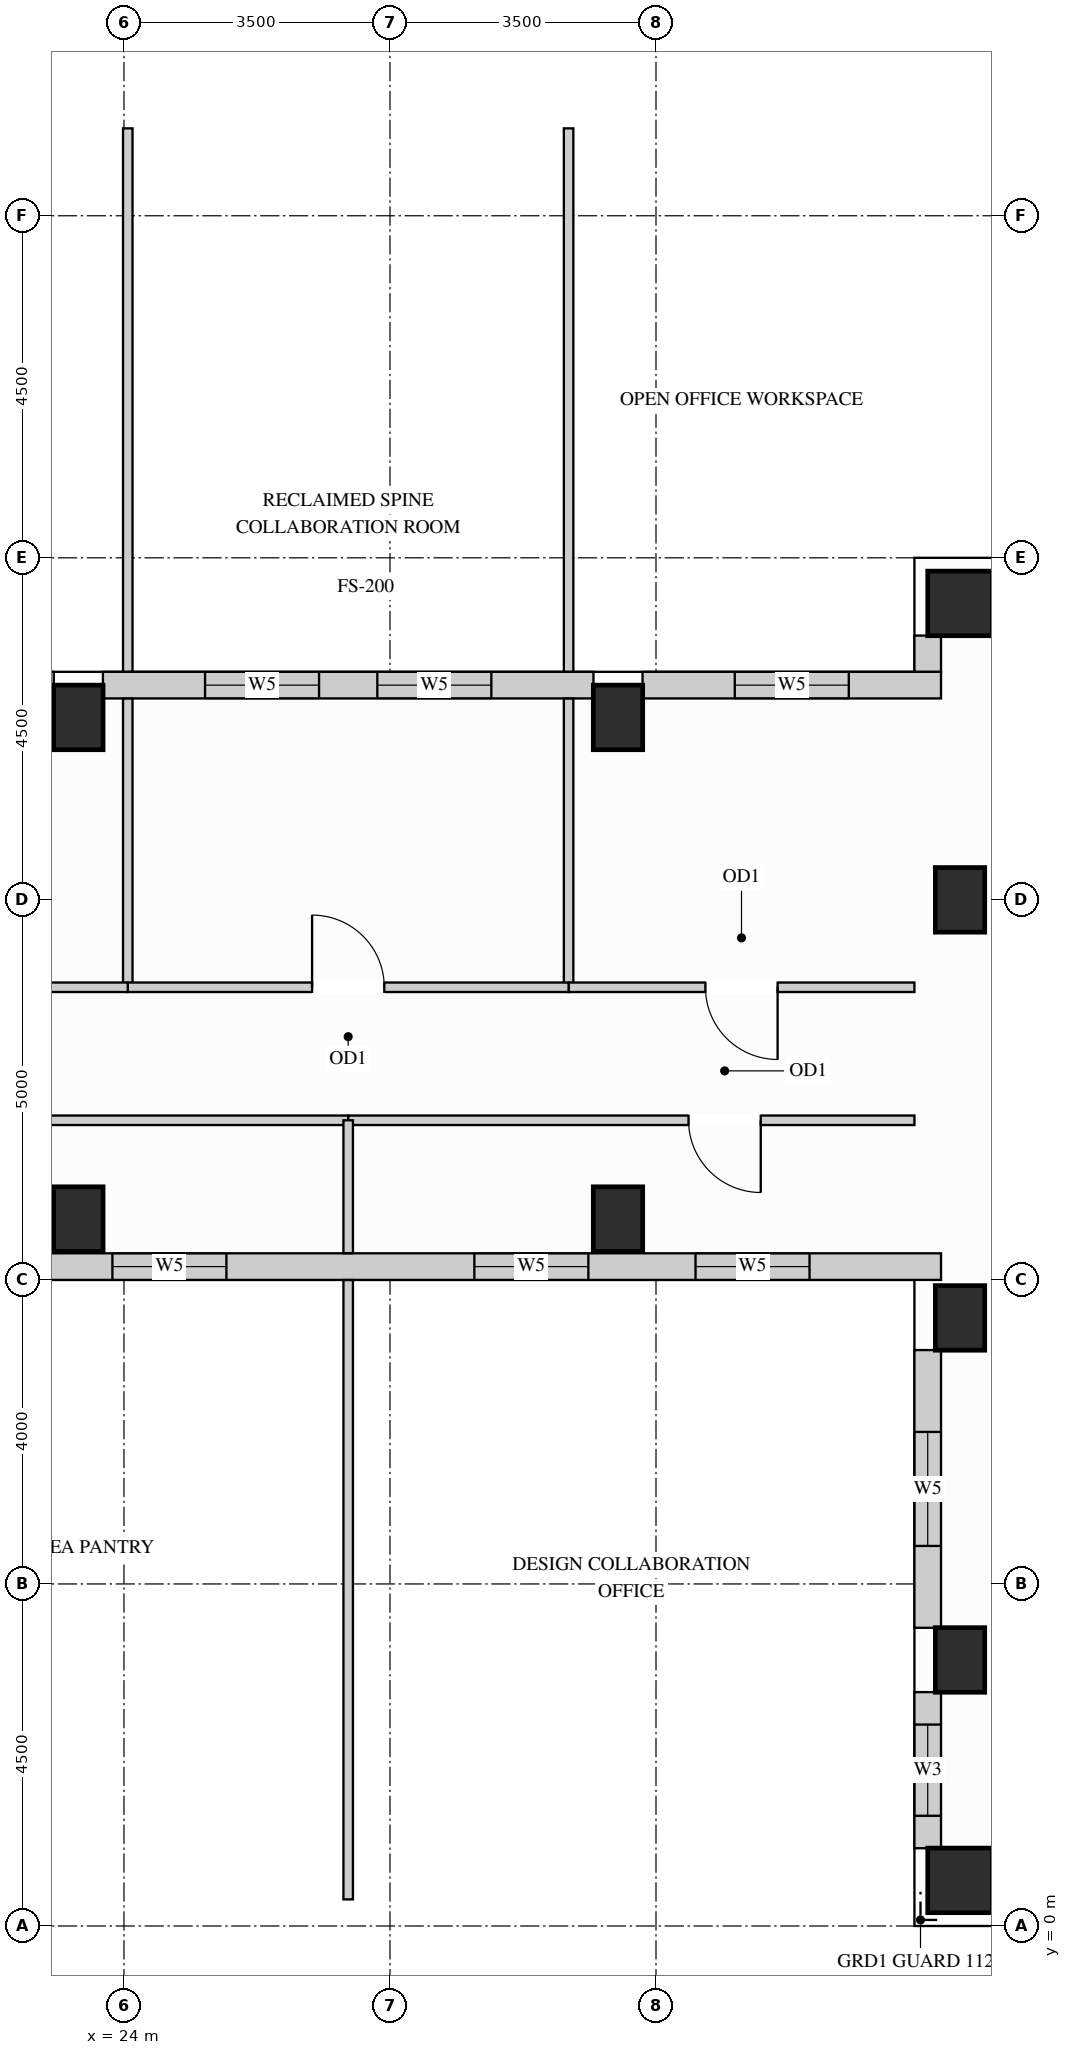
"""IFC4 building model, lengths in metres.
Left out: names, types, materials, properties, quantities, classifications, styles, units other than length and angle.
Written with IfcOpenShell. Run it as: python <this file> out.ifc"""

import sys

from ifc_helpers import new_model, si_unit, direction, frame, frame_2d, origin, origin_2d, place, context, subcontext, project, spatial, rectangle, extrude, source, transform, mapped, element, fill, save


model = new_model("IFC4")
c1 = context("Model", 3, precision=1e-05, world=origin(), true_north=direction((0.0, 1.0)))
c2 = subcontext(c1, "Body", "Model", "MODEL_VIEW")
j1 = project(units=[si_unit("LENGTHUNIT", "METRE"), si_unit("PLANEANGLEUNIT", "RADIAN")], contexts=[c1])
p1 = place(None, origin())
s1 = spatial("IfcSite", under=j1, at=p1, CompositionType="ELEMENT")
p2 = place(p1, origin())
s2 = spatial("IfcBuilding", under=s1, at=p2, CompositionType="ELEMENT")
p3 = place(p2, frame((0.0, 0.0, 237.6)))
s3 = spatial("IfcBuildingStorey", under=s2, at=p3, CompositionType="ELEMENT", Elevation=237.6)
m1 = source(origin(), c2, "Body", "SweptSolid", [
    extrude(rectangle(XDim=0.65, YDim=0.85, at=origin_2d()), origin(), (0.0, 0.0, 1.0), 3.4),
])
for number, where, z_axis, x_axis in (
    (1, (35.0, 13.5, 0.0), (0.0, 0.0, 1.0), (1.0, 0.0, 0.0)),
    (2, (35.0, 3.5, 0.0), (0.0, 0.0, 1.0), (1.0, 0.0, 0.0)),
    (3, (35.0, 8.0, 0.0), (0.0, 0.0, 1.0), (1.0, 0.0, 0.0)),
    (4, (23.4, 15.9, 0.0), (0.0, 0.0, 1.0), (1.0, 0.0, 0.0)),
    (5, (23.4, 9.3, 0.0), (0.0, 0.0, 1.0), (1.0, 0.0, 0.0)),
    (6, (30.5, 15.9, 0.0), (0.0, 0.0, 1.0), (1.0, 0.0, 0.0)),
    (7, (30.5, 9.3, 0.0), (0.0, 0.0, 1.0), (1.0, 0.0, 0.0)),
):
    element("IfcColumn", number, at=place(p3, frame(where, z_axis=z_axis, x_axis=x_axis)), inside=s3, PredefinedType="COLUMN", context=c2, shape_type="MappedRepresentation", body=[
        mapped(m1, transform((0.0, 0.0, 0.0), x_axis=(1.0, 0.0, 0.0), y_axis=(0.0, 1.0, 0.0), z_axis=(0.0, 0.0, 1.0))),
    ])
m2 = source(origin(), c2, "Body", "SweptSolid", [
    extrude(rectangle(XDim=0.85, YDim=0.85, at=origin_2d()), origin(), (0.0, 0.0, 1.0), 3.4),
])
for number, where, z_axis, x_axis in (
    (8, (35.0, 17.4, 0.0), (0.0, 0.0, 1.0), (1.0, 0.0, 0.0)),
    (9, (35.0, 0.6, 0.0), (0.0, 0.0, 1.0), (1.0, 0.0, 0.0)),
):
    element("IfcColumn", number, at=place(p3, frame(where, z_axis=z_axis, x_axis=x_axis)), inside=s3, PredefinedType="COLUMN", context=c2, shape_type="MappedRepresentation", body=[
        mapped(m2, transform((0.0, 0.0, 0.0), x_axis=(1.0, 0.0, 0.0), y_axis=(0.0, 1.0, 0.0), z_axis=(0.0, 0.0, 1.0))),
    ])
p4 = place(p3, frame((19.323, 8.675, 0.0), z_axis=(0.0, 0.0, 1.0), x_axis=(1.0, 0.0, 0.0)))
e10 = element("IfcWall", 10, at=p4, inside=s3, PredefinedType="SOLIDWALL", context=c2, shape_type="SweptSolid", body=[
    extrude(rectangle(XDim=15.427, YDim=0.35, at=frame_2d((7.713, 0.0))), origin(), (0.0, 0.0, 1.0), 3.385),
])
p5 = place(p4, frame((1.672, 0.0, 0.78)))
e11 = element("IfcOpeningElement", 11, at=p5, cuts=e10, PredefinedType="OPENING", context=c2, shape_type="SweptSolid", body=[
    extrude(rectangle(XDim=1.5, YDim=2.0, at=frame_2d((0.75, 1.0))), frame((0.0, 0.185, 0.0), z_axis=(0.0, -1.0, 0.0), x_axis=(1.0, 0.0, 0.0)), (0.0, 0.0, 1.0), 0.37),
])
p6 = place(p4, frame((4.525, 0.0, 0.78)))
e12 = element("IfcOpeningElement", 12, at=p6, cuts=e10, PredefinedType="OPENING", context=c2, shape_type="SweptSolid", body=[
    extrude(rectangle(XDim=1.5, YDim=2.0, at=frame_2d((0.75, 1.0))), frame((0.0, 0.185, 0.0), z_axis=(0.0, -1.0, 0.0), x_axis=(1.0, 0.0, 0.0)), (0.0, 0.0, 1.0), 0.37),
])
p7 = place(p4, frame((9.287, 0.0, 0.78)))
e13 = element("IfcOpeningElement", 13, at=p7, cuts=e10, PredefinedType="OPENING", context=c2, shape_type="SweptSolid", body=[
    extrude(rectangle(XDim=1.5, YDim=2.0, at=frame_2d((0.75, 1.0))), frame((0.0, 0.185, 0.0), z_axis=(0.0, -1.0, 0.0), x_axis=(1.0, 0.0, 0.0)), (0.0, 0.0, 1.0), 0.37),
])
p8 = place(p4, frame((12.197, 0.0, 0.78)))
e14 = element("IfcOpeningElement", 14, at=p8, cuts=e10, PredefinedType="OPENING", context=c2, shape_type="SweptSolid", body=[
    extrude(rectangle(XDim=1.5, YDim=2.0, at=frame_2d((0.75, 1.0))), frame((0.0, 0.185, 0.0), z_axis=(0.0, -1.0, 0.0), x_axis=(1.0, 0.0, 0.0)), (0.0, 0.0, 1.0), 0.37),
])
p9 = place(p3, frame((34.575, 7.577, 0.0), z_axis=(0.0, 0.0, 1.0), x_axis=(0.0, -1.0, 0.0)))
e15 = element("IfcWall", 15, at=p9, inside=s3, PredefinedType="SOLIDWALL", context=c2, shape_type="SweptSolid", body=[
    extrude(rectangle(XDim=3.654, YDim=0.35, at=frame_2d((1.827, 0.0))), origin(), (0.0, 0.0, 1.0), 3.385),
])
p10 = place(p9, frame((1.077, 0.0, 0.78)))
e16 = element("IfcOpeningElement", 16, at=p10, cuts=e15, PredefinedType="OPENING", context=c2, shape_type="SweptSolid", body=[
    extrude(rectangle(XDim=1.5, YDim=2.0, at=frame_2d((0.75, 1.0))), frame((0.0, 0.185, 0.0), z_axis=(0.0, -1.0, 0.0), x_axis=(1.0, 0.0, 0.0)), (0.0, 0.0, 1.0), 0.37),
])
p11 = place(p3, frame((34.575, 3.077, 0.0), z_axis=(0.0, 0.0, 1.0), x_axis=(0.0, -1.0, 0.0)))
e17 = element("IfcWall", 17, at=p11, inside=s3, PredefinedType="SOLIDWALL", context=c2, shape_type="SweptSolid", body=[
    extrude(rectangle(XDim=2.054, YDim=0.35, at=frame_2d((1.027, 0.0))), origin(), (0.0, 0.0, 1.0), 3.385),
])
p12 = place(p11, frame((0.427, 0.0, 0.78)))
e18 = element("IfcOpeningElement", 18, at=p12, cuts=e17, PredefinedType="OPENING", context=c2, shape_type="SweptSolid", body=[
    extrude(rectangle(XDim=1.2, YDim=2.0, at=frame_2d((0.6, 1.0))), frame((0.0, 0.185, 0.0), z_axis=(0.0, -1.0, 0.0), x_axis=(1.0, 0.0, 0.0)), (0.0, 0.0, 1.0), 0.37),
])
m3 = source(origin(), c2, "Body", "SweptSolid", [
    extrude(rectangle(XDim=0.479, YDim=0.35, at=frame_2d((0.24, 0.0))), origin(), (0.0, 0.0, 1.0), 3.385),
])
p13 = place(p3, frame((34.575, 16.977, 0.0), z_axis=(0.0, 0.0, 1.0), x_axis=(0.0, -1.0, 0.0)))
e19 = element("IfcWall", 19, at=p13, inside=s3, PredefinedType="SOLIDWALL", context=c2, shape_type="MappedRepresentation", body=[
    mapped(m3, transform((0.0, 0.0, 0.0), x_axis=(1.0, 0.0, 0.0), y_axis=(0.0, 1.0, 0.0), z_axis=(0.0, 0.0, 1.0))),
])
p14 = place(p3, frame((34.75, 16.325, 0.0), z_axis=(0.0, 0.0, 1.0), x_axis=(-1.0, 0.0, 0.0)))
e20 = element("IfcWall", 20, at=p14, inside=s3, PredefinedType="SOLIDWALL", context=c2, shape_type="SweptSolid", body=[
    extrude(rectangle(XDim=3.927, YDim=0.35, at=frame_2d((1.963, 0.0))), origin(), (0.0, 0.0, 1.0), 3.385),
])
p15 = place(p14, frame((1.213, 0.0, 0.78)))
e21 = element("IfcOpeningElement", 21, at=p15, cuts=e20, PredefinedType="OPENING", context=c2, shape_type="SweptSolid", body=[
    extrude(rectangle(XDim=1.5, YDim=2.0, at=frame_2d((0.75, 1.0))), frame((0.0, 0.185, 0.0), z_axis=(0.0, -1.0, 0.0), x_axis=(1.0, 0.0, 0.0)), (0.0, 0.0, 1.0), 0.37),
])
p16 = place(p3, frame((30.177, 16.325, 0.0), z_axis=(0.0, 0.0, 1.0), x_axis=(-1.0, 0.0, 0.0)))
e22 = element("IfcWall", 22, at=p16, inside=s3, PredefinedType="SOLIDWALL", context=c2, shape_type="SweptSolid", body=[
    extrude(rectangle(XDim=6.454, YDim=0.35, at=frame_2d((3.227, 0.0))), origin(), (0.0, 0.0, 1.0), 3.385),
])
p17 = place(p16, frame((1.344, 0.0, 0.78)))
e23 = element("IfcOpeningElement", 23, at=p17, cuts=e22, PredefinedType="OPENING", context=c2, shape_type="SweptSolid", body=[
    extrude(rectangle(XDim=1.5, YDim=2.0, at=frame_2d((0.75, 1.0))), frame((0.0, 0.185, 0.0), z_axis=(0.0, -1.0, 0.0), x_axis=(1.0, 0.0, 0.0)), (0.0, 0.0, 1.0), 0.37),
])
p18 = place(p16, frame((3.61, 0.0, 0.78)))
e24 = element("IfcOpeningElement", 24, at=p18, cuts=e22, PredefinedType="OPENING", context=c2, shape_type="SweptSolid", body=[
    extrude(rectangle(XDim=1.5, YDim=2.0, at=frame_2d((0.75, 1.0))), frame((0.0, 0.185, 0.0), z_axis=(0.0, -1.0, 0.0), x_axis=(1.0, 0.0, 0.0)), (0.0, 0.0, 1.0), 0.37),
])
p19 = place(p3, frame((23.077, 16.325, 0.0), z_axis=(0.0, 0.0, 1.0), x_axis=(-1.0, 0.0, 0.0)))
e25 = element("IfcWall", 25, at=p19, inside=s3, PredefinedType="SOLIDWALL", context=c2, shape_type="SweptSolid", body=[
    extrude(rectangle(XDim=3.927, YDim=0.35, at=frame_2d((1.963, 0.0))), origin(), (0.0, 0.0, 1.0), 3.385),
])
p20 = place(p19, frame((1.213, 0.0, 0.78)))
e26 = element("IfcOpeningElement", 26, at=p20, cuts=e25, PredefinedType="OPENING", context=c2, shape_type="SweptSolid", body=[
    extrude(rectangle(XDim=1.5, YDim=2.0, at=frame_2d((0.75, 1.0))), frame((0.0, 0.185, 0.0), z_axis=(0.0, -1.0, 0.0), x_axis=(1.0, 0.0, 0.0)), (0.0, 0.0, 1.0), 0.37),
])
m4 = source(origin(), c2, "Body", "SweptSolid", [
    extrude(rectangle(XDim=3.798, YDim=0.125, at=frame_2d((1.899, 0.0))), origin(), (0.0, 0.0, 1.0), 3.385),
])
p21 = place(p3, frame((24.05, 12.35, 0.0), z_axis=(0.0, 0.0, 1.0), x_axis=(0.0, 1.0, 0.0)))
e27 = element("IfcWall", 27, at=p21, inside=s3, PredefinedType="PARTITIONING", context=c2, shape_type="MappedRepresentation", body=[
    mapped(m4, transform((0.0, 0.0, 0.0), x_axis=(1.0, 0.0, 0.0), y_axis=(0.0, 1.0, 0.0), z_axis=(0.0, 0.0, 1.0))),
])
m5 = source(origin(), c2, "Body", "SweptSolid", [
    extrude(rectangle(XDim=7.148, YDim=0.125, at=frame_2d((3.574, 0.0))), origin(), (0.0, 0.0, 1.0), 3.385),
])
p22 = place(p3, frame((24.05, 16.502, 0.0), z_axis=(0.0, 0.0, 1.0), x_axis=(0.0, 1.0, 0.0)))
e28 = element("IfcWall", 28, at=p22, inside=s3, PredefinedType="PARTITIONING", context=c2, shape_type="MappedRepresentation", body=[
    mapped(m5, transform((0.0, 0.0, 0.0), x_axis=(1.0, 0.0, 0.0), y_axis=(0.0, 1.0, 0.0), z_axis=(0.0, 0.0, 1.0))),
])
p23 = place(p3, frame((29.85, 12.35, 0.0), z_axis=(0.0, 0.0, 1.0), x_axis=(0.0, 1.0, 0.0)))
e29 = element("IfcWall", 29, at=p23, inside=s3, PredefinedType="PARTITIONING", context=c2, shape_type="MappedRepresentation", body=[
    mapped(m4, transform((0.0, 0.0, 0.0), x_axis=(1.0, 0.0, 0.0), y_axis=(0.0, 1.0, 0.0), z_axis=(0.0, 0.0, 1.0))),
])
p24 = place(p3, frame((29.85, 16.502, 0.0), z_axis=(0.0, 0.0, 1.0), x_axis=(0.0, 1.0, 0.0)))
e30 = element("IfcWall", 30, at=p24, inside=s3, PredefinedType="PARTITIONING", context=c2, shape_type="MappedRepresentation", body=[
    mapped(m5, transform((0.0, 0.0, 0.0), x_axis=(1.0, 0.0, 0.0), y_axis=(0.0, 1.0, 0.0), z_axis=(0.0, 0.0, 1.0))),
])
p25 = place(p3, frame((29.85, 12.35, 0.0), z_axis=(0.0, 0.0, 1.0), x_axis=(1.0, 0.0, 0.0)))
e31 = element("IfcWall", 31, at=p25, inside=s3, PredefinedType="PARTITIONING", context=c2, shape_type="SweptSolid", body=[
    extrude(rectangle(XDim=4.55, YDim=0.125, at=frame_2d((2.275, 0.0))), origin(), (0.0, 0.0, 1.0), 3.385),
])
p26 = place(p25, frame((1.8, 0.0, 0.0)))
e32 = element("IfcOpeningElement", 32, at=p26, cuts=e31, PredefinedType="OPENING", context=c2, shape_type="SweptSolid", body=[
    extrude(rectangle(XDim=0.95, YDim=2.15, at=frame_2d((0.475, 1.075))), frame((0.0, 0.073, 0.0), z_axis=(0.0, -1.0, 0.0), x_axis=(1.0, 0.0, 0.0)), (0.0, 0.0, 1.0), 0.145),
])
p27 = place(p3, frame((24.05, 12.35, 0.0), z_axis=(0.0, 0.0, 1.0), x_axis=(1.0, 0.0, 0.0)))
e33 = element("IfcWall", 33, at=p27, inside=s3, PredefinedType="PARTITIONING", context=c2, shape_type="SweptSolid", body=[
    extrude(rectangle(XDim=5.8, YDim=0.125, at=frame_2d((2.9, 0.0))), origin(), (0.0, 0.0, 1.0), 3.385),
])
p28 = place(p27, frame((2.425, 0.0, 0.0)))
e34 = element("IfcOpeningElement", 34, at=p28, cuts=e33, PredefinedType="OPENING", context=c2, shape_type="SweptSolid", body=[
    extrude(rectangle(XDim=0.95, YDim=2.15, at=frame_2d((0.475, 1.075))), frame((0.0, 0.073, 0.0), z_axis=(0.0, -1.0, 0.0), x_axis=(1.0, 0.0, 0.0)), (0.0, 0.0, 1.0), 0.145),
])
p29 = place(p3, frame((19.5, 12.35, 0.0), z_axis=(0.0, 0.0, 1.0), x_axis=(1.0, 0.0, 0.0)))
e35 = element("IfcWall", 35, at=p29, inside=s3, PredefinedType="PARTITIONING", context=c2, shape_type="SweptSolid", body=[
    extrude(rectangle(XDim=4.55, YDim=0.125, at=frame_2d((2.275, 0.0))), origin(), (0.0, 0.0, 1.0), 3.385),
])
p30 = place(p29, frame((1.8, 0.0, 0.0)))
e36 = element("IfcOpeningElement", 36, at=p30, cuts=e35, PredefinedType="OPENING", context=c2, shape_type="SweptSolid", body=[
    extrude(rectangle(XDim=0.95, YDim=2.15, at=frame_2d((0.475, 1.075))), frame((0.0, 0.073, 0.0), z_axis=(0.0, -1.0, 0.0), x_axis=(1.0, 0.0, 0.0)), (0.0, 0.0, 1.0), 0.145),
])
p31 = place(p3, frame((19.5, 10.6, 0.0), z_axis=(0.0, 0.0, 1.0), x_axis=(1.0, 0.0, 0.0)))
e37 = element("IfcWall", 37, at=p31, inside=s3, PredefinedType="PARTITIONING", context=c2, shape_type="SweptSolid", body=[
    extrude(rectangle(XDim=7.45, YDim=0.125, at=frame_2d((3.725, 0.0))), origin(), (0.0, 0.0, 1.0), 3.385),
])
p32 = place(p31, frame((2.022, 0.0, 0.0)))
e38 = element("IfcOpeningElement", 38, at=p32, cuts=e37, PredefinedType="OPENING", context=c2, shape_type="SweptSolid", body=[
    extrude(rectangle(XDim=0.95, YDim=2.15, at=frame_2d((0.475, 1.075))), frame((0.0, 0.073, 0.0), z_axis=(0.0, -1.0, 0.0), x_axis=(1.0, 0.0, 0.0)), (0.0, 0.0, 1.0), 0.145),
])
p33 = place(p3, frame((26.95, 10.6, 0.0), z_axis=(0.0, 0.0, 1.0), x_axis=(1.0, 0.0, 0.0)))
e39 = element("IfcWall", 39, at=p33, inside=s3, PredefinedType="PARTITIONING", context=c2, shape_type="SweptSolid", body=[
    extrude(rectangle(XDim=7.45, YDim=0.125, at=frame_2d((3.725, 0.0))), origin(), (0.0, 0.0, 1.0), 3.385),
])
p34 = place(p33, frame((4.478, 0.0, 0.0)))
e40 = element("IfcOpeningElement", 40, at=p34, cuts=e39, PredefinedType="OPENING", context=c2, shape_type="SweptSolid", body=[
    extrude(rectangle(XDim=0.95, YDim=2.15, at=frame_2d((0.475, 1.075))), frame((0.0, 0.073, 0.0), z_axis=(0.0, -1.0, 0.0), x_axis=(1.0, 0.0, 0.0)), (0.0, 0.0, 1.0), 0.145),
])
m6 = source(origin(), c2, "Body", "SweptSolid", [
    extrude(rectangle(XDim=8.148, YDim=0.125, at=frame_2d((4.074, 0.0))), origin(), (0.0, 0.0, 1.0), 3.385),
])
p35 = place(p3, frame((26.95, 0.35, 0.0), z_axis=(0.0, 0.0, 1.0), x_axis=(0.0, 1.0, 0.0)))
e41 = element("IfcWall", 41, at=p35, inside=s3, PredefinedType="PARTITIONING", context=c2, shape_type="MappedRepresentation", body=[
    mapped(m6, transform((0.0, 0.0, 0.0), x_axis=(1.0, 0.0, 0.0), y_axis=(0.0, 1.0, 0.0), z_axis=(0.0, 0.0, 1.0))),
])
m7 = source(origin(), c2, "Body", "SweptSolid", [
    extrude(rectangle(XDim=1.748, YDim=0.125, at=frame_2d((0.874, 0.0))), origin(), (0.0, 0.0, 1.0), 3.385),
])
p36 = place(p3, frame((26.95, 8.852, 0.0), z_axis=(0.0, 0.0, 1.0), x_axis=(0.0, 1.0, 0.0)))
e42 = element("IfcWall", 42, at=p36, inside=s3, PredefinedType="PARTITIONING", context=c2, shape_type="MappedRepresentation", body=[
    mapped(m7, transform((0.0, 0.0, 0.0), x_axis=(1.0, 0.0, 0.0), y_axis=(0.0, 1.0, 0.0), z_axis=(0.0, 0.0, 1.0))),
])
m8 = source(origin(), c2, "Body", "SweptSolid", [
    extrude(rectangle(XDim=0.95, YDim=2.15, at=frame_2d((0.475, 1.075))), frame((0.0, 0.025, 0.0), z_axis=(0.0, -1.0, 0.0), x_axis=(1.0, 0.0, 0.0)), (0.0, 0.0, 1.0), 0.05),
])
p37 = place(p28, origin())
e43 = element("IfcDoor", 43, at=p37, inside=s3, OperationType="SINGLE_SWING_LEFT", PredefinedType="DOOR", context=c2, shape_type="MappedRepresentation", body=[
    mapped(m8, transform((0.0, 0.0, 0.0), x_axis=(1.0, 0.0, 0.0), y_axis=(0.0, 1.0, 0.0), z_axis=(0.0, 0.0, 1.0))),
])
fill(e34, e43)
p38 = place(p26, origin())
e44 = element("IfcDoor", 44, at=p38, inside=s3, OperationType="SINGLE_SWING_RIGHT", PredefinedType="DOOR", context=c2, shape_type="MappedRepresentation", body=[
    mapped(m8, transform((0.0, 0.0, 0.0), x_axis=(1.0, 0.0, 0.0), y_axis=(0.0, 1.0, 0.0), z_axis=(0.0, 0.0, 1.0))),
])
fill(e32, e44)
p39 = place(p34, origin())
e45 = element("IfcDoor", 45, at=p39, inside=s3, OperationType="SINGLE_SWING_RIGHT", PredefinedType="DOOR", context=c2, shape_type="MappedRepresentation", body=[
    mapped(m8, transform((0.0, 0.0, 0.0), x_axis=(1.0, 0.0, 0.0), y_axis=(0.0, 1.0, 0.0), z_axis=(0.0, 0.0, 1.0))),
])
fill(e40, e45)
m9 = source(origin(), c2, "Body", "SweptSolid", [
    extrude(rectangle(XDim=1.2, YDim=2.0, at=frame_2d((0.6, 1.0))), frame((0.0, 0.03, 0.0), z_axis=(0.0, -1.0, 0.0), x_axis=(1.0, 0.0, 0.0)), (0.0, 0.0, 1.0), 0.06),
])
p40 = place(p12, origin())
e46 = element("IfcWindow", 46, at=p40, inside=s3, PartitioningType="SINGLE_PANEL", PredefinedType="WINDOW", context=c2, shape_type="MappedRepresentation", body=[
    mapped(m9, transform((0.0, 0.0, 0.0), x_axis=(1.0, 0.0, 0.0), y_axis=(0.0, 1.0, 0.0), z_axis=(0.0, 0.0, 1.0))),
])
fill(e18, e46)
m10 = source(origin(), c2, "Body", "SweptSolid", [
    extrude(rectangle(XDim=1.5, YDim=2.0, at=frame_2d((0.75, 1.0))), frame((0.0, 0.03, 0.0), z_axis=(0.0, -1.0, 0.0), x_axis=(1.0, 0.0, 0.0)), (0.0, 0.0, 1.0), 0.06),
])
p41 = place(p6, origin())
e47 = element("IfcWindow", 47, at=p41, inside=s3, PartitioningType="SINGLE_PANEL", PredefinedType="WINDOW", context=c2, shape_type="MappedRepresentation", body=[
    mapped(m10, transform((0.0, 0.0, 0.0), x_axis=(1.0, 0.0, 0.0), y_axis=(0.0, 1.0, 0.0), z_axis=(0.0, 0.0, 1.0))),
])
fill(e12, e47)
p42 = place(p7, origin())
e48 = element("IfcWindow", 48, at=p42, inside=s3, PartitioningType="SINGLE_PANEL", PredefinedType="WINDOW", context=c2, shape_type="MappedRepresentation", body=[
    mapped(m10, transform((0.0, 0.0, 0.0), x_axis=(1.0, 0.0, 0.0), y_axis=(0.0, 1.0, 0.0), z_axis=(0.0, 0.0, 1.0))),
])
fill(e13, e48)
p43 = place(p8, origin())
e49 = element("IfcWindow", 49, at=p43, inside=s3, PartitioningType="SINGLE_PANEL", PredefinedType="WINDOW", context=c2, shape_type="MappedRepresentation", body=[
    mapped(m10, transform((0.0, 0.0, 0.0), x_axis=(1.0, 0.0, 0.0), y_axis=(0.0, 1.0, 0.0), z_axis=(0.0, 0.0, 1.0))),
])
fill(e14, e49)
p44 = place(p10, origin())
e50 = element("IfcWindow", 50, at=p44, inside=s3, PartitioningType="SINGLE_PANEL", PredefinedType="WINDOW", context=c2, shape_type="MappedRepresentation", body=[
    mapped(m10, transform((0.0, 0.0, 0.0), x_axis=(1.0, 0.0, 0.0), y_axis=(0.0, 1.0, 0.0), z_axis=(0.0, 0.0, 1.0))),
])
fill(e16, e50)
p45 = place(p15, origin())
e51 = element("IfcWindow", 51, at=p45, inside=s3, PartitioningType="SINGLE_PANEL", PredefinedType="WINDOW", context=c2, shape_type="MappedRepresentation", body=[
    mapped(m10, transform((0.0, 0.0, 0.0), x_axis=(1.0, 0.0, 0.0), y_axis=(0.0, 1.0, 0.0), z_axis=(0.0, 0.0, 1.0))),
])
fill(e21, e51)
p46 = place(p17, origin())
e52 = element("IfcWindow", 52, at=p46, inside=s3, PartitioningType="SINGLE_PANEL", PredefinedType="WINDOW", context=c2, shape_type="MappedRepresentation", body=[
    mapped(m10, transform((0.0, 0.0, 0.0), x_axis=(1.0, 0.0, 0.0), y_axis=(0.0, 1.0, 0.0), z_axis=(0.0, 0.0, 1.0))),
])
fill(e23, e52)
p47 = place(p18, origin())
e53 = element("IfcWindow", 53, at=p47, inside=s3, PartitioningType="SINGLE_PANEL", PredefinedType="WINDOW", context=c2, shape_type="MappedRepresentation", body=[
    mapped(m10, transform((0.0, 0.0, 0.0), x_axis=(1.0, 0.0, 0.0), y_axis=(0.0, 1.0, 0.0), z_axis=(0.0, 0.0, 1.0))),
])
fill(e24, e53)
save(model, sys.argv[1])
